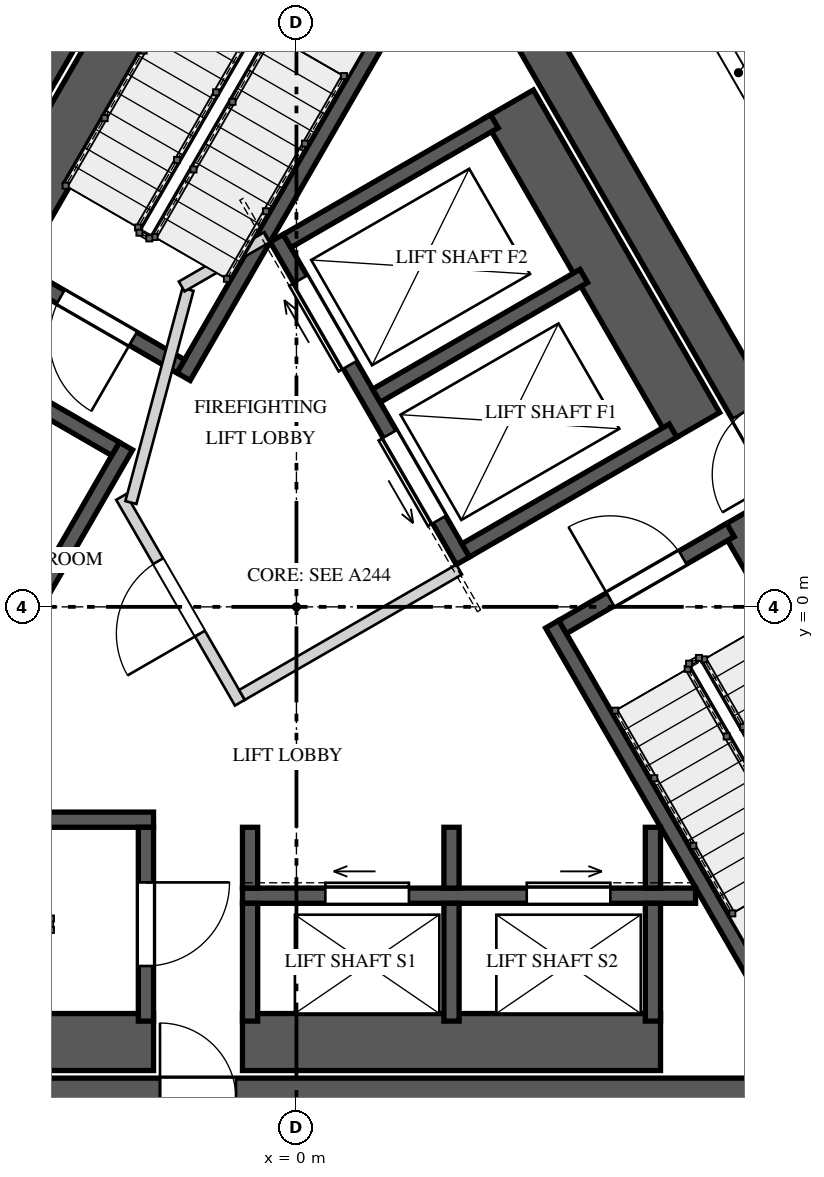
"""IFC4 building model, lengths in metres.
Left out: names, types, materials, properties, quantities, classifications, styles, units other than length and angle.
Written with IfcOpenShell. Run it as: python <this file> out.ifc"""

import sys

from ifc_helpers import new_model, si_unit, direction, frame, frame_2d, origin, place, context, subcontext, project, spatial, polyline, rectangle, outline, extrude, element, fill, save


model = new_model("IFC4")
c1 = context("Model", 3, precision=1e-05, world=origin(), true_north=direction((0.0, 1.0)))
c2 = subcontext(c1, "Body", "Model", "MODEL_VIEW")
j1 = project(units=[si_unit("LENGTHUNIT", "METRE"), si_unit("PLANEANGLEUNIT", "RADIAN")], contexts=[c1])
p1 = place(None, origin())
s1 = spatial("IfcSite", under=j1, at=p1, CompositionType="ELEMENT")
p2 = place(p1, origin())
s2 = spatial("IfcBuilding", under=s1, at=p2, CompositionType="ELEMENT")
p3 = place(p2, frame((0.0, 0.0, 344.4)))
s3 = spatial("IfcBuildingStorey", under=s2, at=p3, CompositionType="ELEMENT", Elevation=344.4)
p4 = place(p3, frame((-1.285, 10.725, 0.0), z_axis=(0.0, 0.0, 1.0), x_axis=(-0.499994590896, -0.86602852671, 0.0)))
e1 = element("IfcWall", 1, at=p4, inside=s3, PredefinedType="SHEAR", context=c2, shape_type="SweptSolid", body=[
    extrude(rectangle(XDim=17.292, YDim=0.55, at=frame_2d((8.646, 0.0))), origin(), (0.0, 0.0, 1.0), 4.0),
])
p5 = place(p4, frame((6.851, 0.0, 0.0)))
e2 = element("IfcOpeningElement", 2, at=p5, cuts=e1, PredefinedType="OPENING", context=c2, shape_type="SweptSolid", body=[
    extrude(rectangle(XDim=1.0, YDim=2.4, at=frame_2d((0.5, 1.2))), frame((0.0, 0.285, 0.0), z_axis=(0.0, -1.0, 0.0), x_axis=(1.0, 0.0, 0.0)), (0.0, 0.0, 1.0), 0.57),
])
p6 = place(p4, frame((15.089, 0.0, 0.0)))
e3 = element("IfcOpeningElement", 3, at=p6, cuts=e1, PredefinedType="OPENING", context=c2, shape_type="SweptSolid", body=[
    extrude(rectangle(XDim=0.8, YDim=2.1, at=frame_2d((0.4, 1.05))), frame((0.0, 0.285, 0.0), z_axis=(0.0, -1.0, 0.0), x_axis=(1.0, 0.0, 0.0)), (0.0, 0.0, 1.0), 0.57),
])
p7 = place(p3, frame((-8.646, -6.475, 0.0), z_axis=(0.0, 0.0, 1.0), x_axis=(1.0, 0.0, 0.0)))
e4 = element("IfcWall", 4, at=p7, inside=s3, PredefinedType="SHEAR", context=c2, shape_type="SweptSolid", body=[
    extrude(rectangle(XDim=17.292, YDim=0.55, at=frame_2d((8.646, 0.0))), origin(), (0.0, 0.0, 1.0), 4.0),
])
p8 = place(p7, frame((6.851, 0.0, 0.0)))
e5 = element("IfcOpeningElement", 5, at=p8, cuts=e4, PredefinedType="OPENING", context=c2, shape_type="SweptSolid", body=[
    extrude(rectangle(XDim=1.0, YDim=2.4, at=frame_2d((0.5, 1.2))), frame((0.0, 0.285, 0.0), z_axis=(0.0, -1.0, 0.0), x_axis=(1.0, 0.0, 0.0)), (0.0, 0.0, 1.0), 0.57),
])
p9 = place(p7, frame((15.089, 0.0, 0.0)))
e6 = element("IfcOpeningElement", 6, at=p9, cuts=e4, PredefinedType="OPENING", context=c2, shape_type="SweptSolid", body=[
    extrude(rectangle(XDim=0.8, YDim=2.1, at=frame_2d((0.4, 1.05))), frame((0.0, 0.285, 0.0), z_axis=(0.0, -1.0, 0.0), x_axis=(1.0, 0.0, 0.0)), (0.0, 0.0, 1.0), 0.57),
])
p10 = place(p3, frame((9.93, -4.25, 0.0), z_axis=(0.0, 0.0, 1.0), x_axis=(-0.499994590896, 0.86602852671, 0.0)))
e7 = element("IfcWall", 7, at=p10, inside=s3, PredefinedType="SHEAR", context=c2, shape_type="SweptSolid", body=[
    extrude(rectangle(XDim=17.292, YDim=0.55, at=frame_2d((8.646, 0.0))), origin(), (0.0, 0.0, 1.0), 4.0),
])
p11 = place(p10, frame((6.921, 0.0, 0.0)))
e8 = element("IfcOpeningElement", 8, at=p11, cuts=e7, PredefinedType="OPENING", context=c2, shape_type="SweptSolid", body=[
    extrude(rectangle(XDim=1.0, YDim=2.4, at=frame_2d((0.5, 1.2))), frame((0.0, 0.285, 0.0), z_axis=(0.0, -1.0, 0.0), x_axis=(1.0, 0.0, 0.0)), (0.0, 0.0, 1.0), 0.57),
])
p12 = place(p3, frame((-0.918, 9.86, 0.0), z_axis=(0.0, 0.0, 1.0), x_axis=(-0.500026960575, -0.86600983753, 0.0)))
e9 = element("IfcWall", 9, at=p12, inside=s3, PredefinedType="SOLIDWALL", context=c2, shape_type="SweptSolid", body=[
    extrude(rectangle(XDim=6.2, YDim=0.75, at=frame_2d((3.1, 0.0))), origin(), (0.0, 0.0, 1.0), 3.65),
])
p13 = place(p3, frame((1.615, 8.397, 0.0), z_axis=(0.0, 0.0, 1.0), x_axis=(-0.500009909098, -0.866019682689, 0.0)))
e10 = element("IfcWall", 10, at=p13, inside=s3, PredefinedType="SOLIDWALL", context=c2, shape_type="SweptSolid", body=[
    extrude(rectangle(XDim=6.2, YDim=0.2, at=frame_2d((3.1, 0.0))), origin(), (0.0, 0.0, 1.0), 3.65),
])
p14 = place(p3, frame((-1.521, 3.165, 0.0), z_axis=(0.0, 0.0, 1.0), x_axis=(-0.866030925526, 0.499990435942, 0.0)))
e11 = element("IfcWall", 11, at=p14, inside=s3, PredefinedType="SOLIDWALL", context=c2, shape_type="SweptSolid", body=[
    extrude(rectangle(XDim=2.55, YDim=0.2, at=frame_2d((1.275, 0.0))), origin(), (0.0, 0.0, 1.0), 3.65),
])
p15 = place(p14, frame((0.725, 0.0, 0.0)))
e12 = element("IfcOpeningElement", 12, at=p15, cuts=e11, PredefinedType="OPENING", context=c2, shape_type="SweptSolid", body=[
    extrude(rectangle(XDim=1.1, YDim=2.4, at=frame_2d((0.55, 1.2))), frame((0.0, 0.11, 0.0), z_axis=(0.0, -1.0, 0.0), x_axis=(1.0, 0.0, 0.0)), (0.0, 0.0, 1.0), 0.22),
])
p16 = place(p3, frame((-8.08, -5.725, 0.0), z_axis=(0.0, 0.0, 1.0), x_axis=(1.0, 0.0, 0.0)))
e13 = element("IfcWall", 13, at=p16, inside=s3, PredefinedType="SOLIDWALL", context=c2, shape_type="SweptSolid", body=[
    extrude(rectangle(XDim=6.2, YDim=0.75, at=frame_2d((3.1, 0.0))), origin(), (0.0, 0.0, 1.0), 3.65),
])
p17 = place(p3, frame((-8.08, -2.8, 0.0), z_axis=(0.0, 0.0, 1.0), x_axis=(1.0, 0.0, 0.0)))
e14 = element("IfcWall", 14, at=p17, inside=s3, PredefinedType="SOLIDWALL", context=c2, shape_type="SweptSolid", body=[
    extrude(rectangle(XDim=6.2, YDim=0.2, at=frame_2d((3.1, 0.0))), origin(), (0.0, 0.0, 1.0), 3.65),
])
p18 = place(p3, frame((-1.98, -2.9, 0.0), z_axis=(0.0, 0.0, 1.0), x_axis=(0.0, -1.0, 0.0)))
e15 = element("IfcWall", 15, at=p18, inside=s3, PredefinedType="SOLIDWALL", context=c2, shape_type="SweptSolid", body=[
    extrude(rectangle(XDim=2.55, YDim=0.2, at=frame_2d((1.275, 0.0))), origin(), (0.0, 0.0, 1.0), 3.65),
])
p19 = place(p18, frame((0.725, 0.0, 0.0)))
e16 = element("IfcOpeningElement", 16, at=p19, cuts=e15, PredefinedType="OPENING", context=c2, shape_type="SweptSolid", body=[
    extrude(rectangle(XDim=1.1, YDim=2.4, at=frame_2d((0.55, 1.2))), frame((0.0, 0.11, 0.0), z_axis=(0.0, -1.0, 0.0), x_axis=(1.0, 0.0, 0.0)), (0.0, 0.0, 1.0), 0.22),
])
p20 = place(p3, frame((8.998, -4.135, 0.0), z_axis=(0.0, 0.0, 1.0), x_axis=(-0.500009909098, 0.866019682689, 0.0)))
e17 = element("IfcWall", 17, at=p20, inside=s3, PredefinedType="SOLIDWALL", context=c2, shape_type="SweptSolid", body=[
    extrude(rectangle(XDim=6.2, YDim=0.75, at=frame_2d((3.1, 0.0))), origin(), (0.0, 0.0, 1.0), 3.65),
])
p21 = place(p3, frame((6.465, -5.597, 0.0), z_axis=(0.0, 0.0, 1.0), x_axis=(-0.49998037582, 0.866036733513, 0.0)))
e18 = element("IfcWall", 18, at=p21, inside=s3, PredefinedType="SOLIDWALL", context=c2, shape_type="SweptSolid", body=[
    extrude(rectangle(XDim=6.2, YDim=0.2, at=frame_2d((3.1, 0.0))), origin(), (0.0, 0.0, 1.0), 3.65),
])
p22 = place(p3, frame((3.501, -0.265, 0.0), z_axis=(0.0, 0.0, 1.0), x_axis=(0.866030925526, 0.499990435942, 0.0)))
e19 = element("IfcWall", 19, at=p22, inside=s3, PredefinedType="SOLIDWALL", context=c2, shape_type="SweptSolid", body=[
    extrude(rectangle(XDim=2.55, YDim=0.2, at=frame_2d((1.275, 0.0))), origin(), (0.0, 0.0, 1.0), 3.65),
])
p23 = place(p22, frame((0.725, 0.0, 0.0)))
e20 = element("IfcOpeningElement", 20, at=p23, cuts=e19, PredefinedType="OPENING", context=c2, shape_type="SweptSolid", body=[
    extrude(rectangle(XDim=1.1, YDim=2.4, at=frame_2d((0.55, 1.2))), frame((0.0, 0.11, 0.0), z_axis=(0.0, -1.0, 0.0), x_axis=(1.0, 0.0, 0.0)), (0.0, 0.0, 1.0), 0.22),
])
p24 = place(p3, frame((-4.993, -2.648, 0.0), z_axis=(0.0, 0.0, 1.0), x_axis=(0.499996545922, 0.866027397988, 0.0)))
e21 = element("IfcWall", 21, at=p24, inside=s3, PredefinedType="SOLIDWALL", context=c2, shape_type="SweptSolid", body=[
    extrude(rectangle(XDim=5.5, YDim=0.2, at=frame_2d((2.75, 0.0))), origin(), (0.0, 0.0, 1.0), 3.65),
])
p25 = place(p24, frame((2.275, 0.0, 0.0)))
e22 = element("IfcOpeningElement", 22, at=p25, cuts=e21, PredefinedType="OPENING", context=c2, shape_type="SweptSolid", body=[
    extrude(rectangle(XDim=0.95, YDim=2.4, at=frame_2d((0.475, 1.2))), frame((0.0, 0.11, 0.0), z_axis=(0.0, -1.0, 0.0), x_axis=(1.0, 0.0, 0.0)), (0.0, 0.0, 1.0), 0.22),
])
p26 = place(p3, frame((-2.38, 2.078, 0.0), z_axis=(0.0, 0.0, 1.0), x_axis=(-0.866061024631, 0.499938297808, 0.0)))
e23 = element("IfcWall", 23, at=p26, inside=s3, PredefinedType="SOLIDWALL", context=c2, shape_type="SweptSolid", body=[
    extrude(rectangle(XDim=2.35, YDim=0.2, at=frame_2d((1.175, 0.0))), origin(), (0.0, 0.0, 1.0), 3.65),
])
p27 = place(p3, frame((-0.71, -3.8, 0.0), z_axis=(0.0, 0.0, 1.0), x_axis=(1.0, 0.0, 0.0)))
e24 = element("IfcWall", 24, at=p27, inside=s3, PredefinedType="SOLIDWALL", context=c2, shape_type="SweptSolid", body=[
    extrude(rectangle(XDim=5.961, YDim=0.2, at=frame_2d((2.981, 0.0))), origin(), (0.0, 0.0, 1.0), 3.65),
])
p28 = place(p27, frame((1.09, 0.0, 0.0)))
e25 = element("IfcOpeningElement", 25, at=p28, cuts=e24, PredefinedType="OPENING", context=c2, shape_type="SweptSolid", body=[
    extrude(rectangle(XDim=1.1, YDim=2.1, at=frame_2d((0.55, 1.05))), frame((0.0, 0.11, 0.0), z_axis=(0.0, -1.0, 0.0), x_axis=(1.0, 0.0, 0.0)), (0.0, 0.0, 1.0), 0.22),
])
p29 = place(p27, frame((3.74, 0.0, 0.0)))
e26 = element("IfcOpeningElement", 26, at=p29, cuts=e24, PredefinedType="OPENING", context=c2, shape_type="SweptSolid", body=[
    extrude(rectangle(XDim=1.1, YDim=2.1, at=frame_2d((0.55, 1.05))), frame((0.0, 0.11, 0.0), z_axis=(0.0, -1.0, 0.0), x_axis=(1.0, 0.0, 0.0)), (0.0, 0.0, 1.0), 0.22),
])
p30 = place(p3, frame((-0.71, -5.725, 0.0), z_axis=(0.0, 0.0, 1.0), x_axis=(1.0, 0.0, 0.0)))
e27 = element("IfcWall", 27, at=p30, inside=s3, PredefinedType="SOLIDWALL", context=c2, shape_type="SweptSolid", body=[
    extrude(rectangle(XDim=5.5, YDim=0.75, at=frame_2d((2.75, 0.0))), origin(), (0.0, 0.0, 1.0), 3.65),
])
p31 = place(p3, frame((-0.61, -3.9, 0.0), z_axis=(0.0, 0.0, 1.0), x_axis=(0.0, -1.0, 0.0)))
e28 = element("IfcWall", 28, at=p31, inside=s3, PredefinedType="SOLIDWALL", context=c2, shape_type="SweptSolid", body=[
    extrude(rectangle(XDim=1.55, YDim=0.2, at=frame_2d((0.775, 0.0))), origin(), (0.0, 0.0, 1.0), 3.65),
])
p32 = place(p3, frame((-0.61, -2.9, 0.0), z_axis=(0.0, 0.0, 1.0), x_axis=(0.0, -1.0, 0.0)))
e29 = element("IfcWall", 29, at=p32, inside=s3, PredefinedType="SOLIDWALL", context=c2, shape_type="SweptSolid", body=[
    extrude(rectangle(XDim=0.8, YDim=0.2, at=frame_2d((0.4, 0.0))), origin(), (0.0, 0.0, 1.0), 3.65),
])
p33 = place(p3, frame((2.04, -3.9, 0.0), z_axis=(0.0, 0.0, 1.0), x_axis=(0.0, -1.0, 0.0)))
e30 = element("IfcWall", 30, at=p33, inside=s3, PredefinedType="SOLIDWALL", context=c2, shape_type="SweptSolid", body=[
    extrude(rectangle(XDim=1.55, YDim=0.2, at=frame_2d((0.775, 0.0))), origin(), (0.0, 0.0, 1.0), 3.65),
])
p34 = place(p3, frame((2.04, -2.9, 0.0), z_axis=(0.0, 0.0, 1.0), x_axis=(0.0, -1.0, 0.0)))
e31 = element("IfcWall", 31, at=p34, inside=s3, PredefinedType="SOLIDWALL", context=c2, shape_type="SweptSolid", body=[
    extrude(rectangle(XDim=0.8, YDim=0.2, at=frame_2d((0.4, 0.0))), origin(), (0.0, 0.0, 1.0), 3.65),
])
p35 = place(p3, frame((4.69, -3.9, 0.0), z_axis=(0.0, 0.0, 1.0), x_axis=(0.0, -1.0, 0.0)))
e32 = element("IfcWall", 32, at=p35, inside=s3, PredefinedType="SOLIDWALL", context=c2, shape_type="SweptSolid", body=[
    extrude(rectangle(XDim=1.55, YDim=0.2, at=frame_2d((0.775, 0.0))), origin(), (0.0, 0.0, 1.0), 3.65),
])
p36 = place(p3, frame((4.69, -2.9, 0.0), z_axis=(0.0, 0.0, 1.0), x_axis=(0.0, -1.0, 0.0)))
e33 = element("IfcWall", 33, at=p36, inside=s3, PredefinedType="SOLIDWALL", context=c2, shape_type="SweptSolid", body=[
    extrude(rectangle(XDim=0.8, YDim=0.2, at=frame_2d((0.4, 0.0))), origin(), (0.0, 0.0, 1.0), 3.65),
])
p37 = place(p3, frame((2.19, 0.606, 0.0), z_axis=(0.0, 0.0, 1.0), x_axis=(-0.500002801628, 0.866023786258, 0.0)))
e34 = element("IfcWall", 34, at=p37, inside=s3, PredefinedType="SOLIDWALL", context=c2, shape_type="SweptSolid", body=[
    extrude(rectangle(XDim=4.9, YDim=0.2, at=frame_2d((2.45, 0.0))), origin(), (0.0, 0.0, 1.0), 3.65),
])
p38 = place(p37, frame((0.625, 0.0, 0.0)))
e35 = element("IfcOpeningElement", 35, at=p38, cuts=e34, PredefinedType="OPENING", context=c2, shape_type="SweptSolid", body=[
    extrude(rectangle(XDim=1.3, YDim=2.1, at=frame_2d((0.65, 1.05))), frame((0.0, 0.11, 0.0), z_axis=(0.0, -1.0, 0.0), x_axis=(1.0, 0.0, 0.0)), (0.0, 0.0, 1.0), 0.22),
])
p39 = place(p37, frame((2.975, 0.0, 0.0)))
e36 = element("IfcOpeningElement", 36, at=p39, cuts=e34, PredefinedType="OPENING", context=c2, shape_type="SweptSolid", body=[
    extrude(rectangle(XDim=1.3, YDim=2.1, at=frame_2d((0.65, 1.05))), frame((0.0, 0.11, 0.0), z_axis=(0.0, -1.0, 0.0), x_axis=(1.0, 0.0, 0.0)), (0.0, 0.0, 1.0), 0.22),
])
p40 = place(p3, frame((5.243, 2.369, 0.0), z_axis=(0.0, 0.0, 1.0), x_axis=(-0.500002801628, 0.866023786258, 0.0)))
e37 = element("IfcWall", 37, at=p40, inside=s3, PredefinedType="SOLIDWALL", context=c2, shape_type="SweptSolid", body=[
    extrude(rectangle(XDim=4.9, YDim=0.75, at=frame_2d((2.45, 0.0))), origin(), (0.0, 0.0, 1.0), 3.65),
])
for number, where, z_axis, x_axis in (
    (38, (2.227, 0.743, 0.0), (0.0, 0.0, 1.0), (0.866, 0.5, 0.0)),
    (39, (1.052, 2.778, 0.0), (0.0, 0.0, 1.0), (0.866, 0.5, 0.0)),
    (40, (-0.123, 4.813, 0.0), (0.0, 0.0, 1.0), (0.866, 0.5, 0.0)),
):
    element("IfcWall", number, at=place(p3, frame(where, z_axis=z_axis, x_axis=x_axis)), inside=s3, PredefinedType="SOLIDWALL", context=c2, shape_type="SweptSolid", body=[
        extrude(rectangle(XDim=3.15, YDim=0.2, at=frame_2d((1.575, 0.0))), origin(), (0.0, 0.0, 1.0), 3.65),
    ])
p41 = place(p3, frame((-0.744, -1.261, 0.0), z_axis=(0.0, 0.0, 1.0), x_axis=(-0.500004234368, 0.866022959057, 0.0)))
e41 = element("IfcWall", 41, at=p41, inside=s3, PredefinedType="PARTITIONING", context=c2, shape_type="SweptSolid", body=[
    extrude(rectangle(XDim=3.125, YDim=0.15, at=frame_2d((1.562, 0.0))), origin(), (0.0, 0.0, 1.0), 3.65),
])
p42 = place(p41, frame((1.05, 0.0, 0.0)))
e42 = element("IfcOpeningElement", 42, at=p42, cuts=e41, PredefinedType="OPENING", context=c2, shape_type="SweptSolid", body=[
    extrude(rectangle(XDim=1.1, YDim=2.4, at=frame_2d((0.55, 1.2))), frame((0.0, 0.085, 0.0), z_axis=(0.0, -1.0, 0.0), x_axis=(1.0, 0.0, 0.0)), (0.0, 0.0, 1.0), 0.17),
])
p43 = place(p3, frame((-0.717, -1.159, 0.0), z_axis=(0.0, 0.0, 1.0), x_axis=(0.866008176907, 0.50002983664, 0.0)))
e43 = element("IfcWall", 43, at=p43, inside=s3, PredefinedType="PARTITIONING", context=c2, shape_type="SweptSolid", body=[
    extrude(rectangle(XDim=3.3, YDim=0.15, at=frame_2d((1.65, 0.0))), origin(), (0.0, 0.0, 1.0), 3.65),
])
p44 = place(p3, frame((-2.178, 1.372, 0.0), z_axis=(0.0, 0.0, 1.0), x_axis=(0.258808958833, 0.96592852884, 0.0)))
e44 = element("IfcWall", 44, at=p44, inside=s3, PredefinedType="PARTITIONING", context=c2, shape_type="SweptSolid", body=[
    extrude(rectangle(XDim=2.903, YDim=0.15, at=frame_2d((1.451, 0.0))), origin(), (0.0, 0.0, 1.0), 3.65),
])
p45 = place(p3, frame((-1.51, 4.215, 0.0), z_axis=(0.0, 0.0, 1.0), x_axis=(0.866085525409, 0.49989585183, 0.0)))
e45 = element("IfcWall", 45, at=p45, inside=s3, PredefinedType="PARTITIONING", context=c2, shape_type="SweptSolid", body=[
    extrude(rectangle(XDim=1.3, YDim=0.15, at=frame_2d((0.65, 0.0))), origin(), (0.0, 0.0, 1.0), 3.65),
])
p46 = place(p3, frame((5.515, 7.547, 0.0), z_axis=(0.0, 0.0, 1.0), x_axis=(0.499986163319, -0.866033392248, 0.0)))
e46 = element("IfcWall", 46, at=p46, inside=s3, PredefinedType="SOLIDWALL", context=c2, shape_type="SweptSolid", body=[
    extrude(outline(polyline([(0.0, 0.0), (1.549, 0.0), (1.549, 2.55), (0.605, 2.55), (0.605, 3.65), (0.0, 3.65), (0.0, 0.0)])), frame((0.0, 0.1, 0.0), z_axis=(0.0, -1.0, 0.0), x_axis=(1.0, 0.0, 0.0)), (0.0, 0.0, 1.0), 0.2),
])
p47 = place(p46, frame((0.05, 0.0, 0.0)))
e47 = element("IfcOpeningElement", 47, at=p47, cuts=e46, PredefinedType="OPENING", context=c2, shape_type="SweptSolid", body=[
    extrude(rectangle(XDim=1.1, YDim=2.4, at=frame_2d((0.55, 1.2))), frame((0.0, 0.11, 0.0), z_axis=(0.0, -1.0, 0.0), x_axis=(1.0, 0.0, 0.0)), (0.0, 0.0, 1.0), 0.22),
])
p48 = place(p15, origin())
e48 = element("IfcDoor", 48, at=p48, inside=s3, OperationType="SINGLE_SWING_RIGHT", PredefinedType="DOOR", context=c2, shape_type="SweptSolid", body=[
    extrude(rectangle(XDim=1.1, YDim=2.4, at=frame_2d((0.55, 1.2))), frame((0.0, 0.025, 0.0), z_axis=(0.0, -1.0, 0.0), x_axis=(1.0, 0.0, 0.0)), (0.0, 0.0, 1.0), 0.05),
])
fill(e12, e48)
p49 = place(p19, origin())
e49 = element("IfcDoor", 49, at=p49, inside=s3, OperationType="SINGLE_SWING_LEFT", PredefinedType="DOOR", context=c2, shape_type="SweptSolid", body=[
    extrude(rectangle(XDim=1.1, YDim=2.4, at=frame_2d((0.55, 1.2))), frame((0.0, 0.025, 0.0), z_axis=(0.0, -1.0, 0.0), x_axis=(1.0, 0.0, 0.0)), (0.0, 0.0, 1.0), 0.05),
])
fill(e16, e49)
p50 = place(p23, origin())
e50 = element("IfcDoor", 50, at=p50, inside=s3, OperationType="SINGLE_SWING_RIGHT", PredefinedType="DOOR", context=c2, shape_type="SweptSolid", body=[
    extrude(rectangle(XDim=1.1, YDim=2.4, at=frame_2d((0.55, 1.2))), frame((0.0, 0.025, 0.0), z_axis=(0.0, -1.0, 0.0), x_axis=(1.0, 0.0, 0.0)), (0.0, 0.0, 1.0), 0.05),
])
fill(e20, e50)
p51 = place(p28, origin())
e51 = element("IfcDoor", 51, at=p51, inside=s3, OperationType="SLIDING_TO_LEFT", PredefinedType="DOOR", context=c2, shape_type="SweptSolid", body=[
    extrude(rectangle(XDim=1.1, YDim=2.1, at=frame_2d((0.55, 1.05))), frame((0.0, 0.025, 0.0), z_axis=(0.0, -1.0, 0.0), x_axis=(1.0, 0.0, 0.0)), (0.0, 0.0, 1.0), 0.05),
])
fill(e25, e51)
p52 = place(p29, origin())
e52 = element("IfcDoor", 52, at=p52, inside=s3, OperationType="SLIDING_TO_RIGHT", PredefinedType="DOOR", context=c2, shape_type="SweptSolid", body=[
    extrude(rectangle(XDim=1.1, YDim=2.1, at=frame_2d((0.55, 1.05))), frame((0.0, 0.025, 0.0), z_axis=(0.0, -1.0, 0.0), x_axis=(1.0, 0.0, 0.0)), (0.0, 0.0, 1.0), 0.05),
])
fill(e26, e52)
p53 = place(p38, origin())
e53 = element("IfcDoor", 53, at=p53, inside=s3, OperationType="SLIDING_TO_LEFT", PredefinedType="DOOR", context=c2, shape_type="SweptSolid", body=[
    extrude(rectangle(XDim=1.3, YDim=2.1, at=frame_2d((0.65, 1.05))), frame((0.0, 0.025, 0.0), z_axis=(0.0, -1.0, 0.0), x_axis=(1.0, 0.0, 0.0)), (0.0, 0.0, 1.0), 0.05),
])
fill(e35, e53)
p54 = place(p39, origin())
e54 = element("IfcDoor", 54, at=p54, inside=s3, OperationType="SLIDING_TO_RIGHT", PredefinedType="DOOR", context=c2, shape_type="SweptSolid", body=[
    extrude(rectangle(XDim=1.3, YDim=2.1, at=frame_2d((0.65, 1.05))), frame((0.0, 0.025, 0.0), z_axis=(0.0, -1.0, 0.0), x_axis=(1.0, 0.0, 0.0)), (0.0, 0.0, 1.0), 0.05),
])
fill(e36, e54)
p55 = place(p42, origin())
e55 = element("IfcDoor", 55, at=p55, inside=s3, OperationType="SINGLE_SWING_LEFT", PredefinedType="DOOR", context=c2, shape_type="SweptSolid", body=[
    extrude(rectangle(XDim=1.1, YDim=2.4, at=frame_2d((0.55, 1.2))), frame((0.0, 0.025, 0.0), z_axis=(0.0, -1.0, 0.0), x_axis=(1.0, 0.0, 0.0)), (0.0, 0.0, 1.0), 0.05),
])
fill(e42, e55)
p56 = place(p47, origin())
e56 = element("IfcDoor", 56, at=p56, inside=s3, OperationType="SINGLE_SWING_LEFT", PredefinedType="DOOR", context=c2, shape_type="SweptSolid", body=[
    extrude(rectangle(XDim=1.1, YDim=2.4, at=frame_2d((0.55, 1.2))), frame((0.0, 0.025, 0.0), z_axis=(0.0, -1.0, 0.0), x_axis=(1.0, 0.0, 0.0)), (0.0, 0.0, 1.0), 0.05),
])
fill(e47, e56)
save(model, sys.argv[1])
